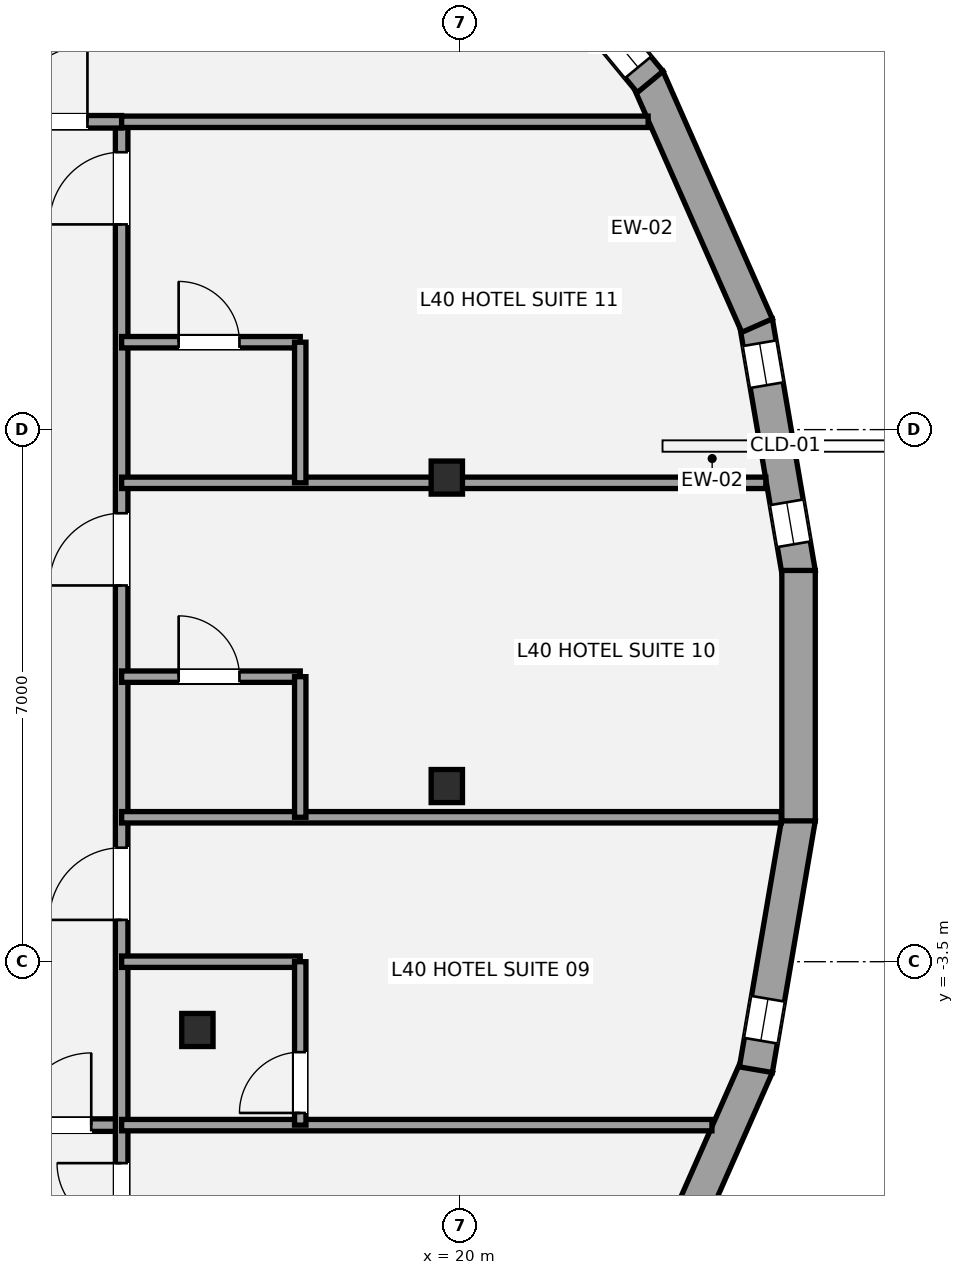
"""IFC4 building model, lengths in metres.
Left out: names, types, materials, properties, quantities, classifications, styles, units other than length and angle.
Written with IfcOpenShell. Run it as: python <this file> out.ifc"""

import sys

from ifc_helpers import new_model, si_unit, direction, frame, frame_2d, origin, origin_2d, place, context, subcontext, project, spatial, rectangle, i_section, extrude, element, fill, save


model = new_model("IFC4")
c1 = context("Model", 3, precision=1e-05, world=origin(), true_north=direction((0.0, 1.0)))
c2 = subcontext(c1, "Body", "Model", "MODEL_VIEW")
j1 = project(units=[si_unit("LENGTHUNIT", "METRE"), si_unit("PLANEANGLEUNIT", "RADIAN")], contexts=[c1])
p1 = place(None, origin())
s1 = spatial("IfcSite", under=j1, at=p1, CompositionType="ELEMENT")
p2 = place(p1, origin())
s2 = spatial("IfcBuilding", under=s1, at=p2, CompositionType="ELEMENT")
p3 = place(p2, frame((0.0, 0.0, 150.2)))
s3 = spatial("IfcBuildingStorey", under=s2, at=p3, CompositionType="ELEMENT", Elevation=150.2)
for number, where, z_axis, x_axis in (
    (1, (19.828, 2.869, 0.0), (0.0, 0.0, 1.0), (1.0, 0.0, 0.0)),
    (2, (16.547, -4.398, 0.0), (0.0, 0.0, 1.0), (1.0, 0.0, 0.0)),
    (3, (19.828, -1.189, 0.0), (0.0, 0.0, 1.0), (1.0, 0.0, 0.0)),
):
    element("IfcColumn", number, at=place(p3, frame(where, z_axis=z_axis, x_axis=x_axis)), inside=s3, PredefinedType="COLUMN", context=c2, shape_type="SweptSolid", body=[
        extrude(i_section(OverallWidth=0.412, OverallDepth=0.435, WebThickness=0.036, FlangeThickness=0.057, at=origin_2d()), origin(), (0.0, 0.0, 1.0), 3.2),
    ])
p4 = place(p3, frame((23.895, 4.921, 0.0), z_axis=(0.0, 0.0, 1.0), x_axis=(0.168075929829, -0.985774052109, 0.0)))
e4 = element("IfcWall", 4, at=p4, inside=s3, PredefinedType="STANDARD", context=c2, shape_type="SweptSolid", body=[
    extrude(rectangle(XDim=3.358, YDim=0.44, at=frame_2d((1.679, 0.0))), origin(), (0.0, 0.0, 1.0), 2.315),
])
p5 = place(p4, frame((2.411, 0.0, 0.58)))
e5 = element("IfcOpeningElement", 5, at=p5, cuts=e4, PredefinedType="OPENING", context=c2, shape_type="SweptSolid", body=[
    extrude(rectangle(XDim=0.56, YDim=1.15, at=frame_2d((0.28, 0.575))), frame((0.0, 0.23, 0.0), z_axis=(0.0, -1.0, 0.0), x_axis=(1.0, 0.0, 0.0)), (0.0, 0.0, 1.0), 0.46),
])
p6 = place(p4, frame((0.288, 0.0, 0.58)))
e6 = element("IfcOpeningElement", 6, at=p6, cuts=e4, PredefinedType="OPENING", context=c2, shape_type="SweptSolid", body=[
    extrude(rectangle(XDim=0.56, YDim=1.15, at=frame_2d((0.28, 0.575))), frame((0.0, 0.23, 0.0), z_axis=(0.0, -1.0, 0.0), x_axis=(1.0, 0.0, 0.0)), (0.0, 0.0, 1.0), 0.46),
])
p7 = place(p3, frame((22.472, 8.126, 0.0), z_axis=(0.0, 0.0, 1.0), x_axis=(0.403999745193, -0.914759097186, 0.0)))
e7 = element("IfcWall", 7, at=p7, inside=s3, PredefinedType="STANDARD", context=c2, shape_type="SweptSolid", body=[
    extrude(rectangle(XDim=3.561, YDim=0.44, at=frame_2d((1.78, 0.0))), origin(), (0.0, 0.0, 1.0), 2.315),
])
p8 = place(p3, frame((20.014, 11.088, 0.0), z_axis=(0.0, 0.0, 1.0), x_axis=(0.637002505989, -0.77086173038, 0.0)))
e8 = element("IfcWall", 8, at=p8, inside=s3, PredefinedType="STANDARD", context=c2, shape_type="SweptSolid", body=[
    extrude(rectangle(XDim=3.908, YDim=0.44, at=frame_2d((1.954, 0.0))), origin(), (0.0, 0.0, 1.0), 2.315),
])
p9 = place(p8, frame((2.76, 0.0, 0.58)))
e9 = element("IfcOpeningElement", 9, at=p9, cuts=e8, PredefinedType="OPENING", context=c2, shape_type="SweptSolid", body=[
    extrude(rectangle(XDim=0.9, YDim=1.35, at=frame_2d((0.45, 0.675))), frame((0.0, 0.23, 0.0), z_axis=(0.0, -1.0, 0.0), x_axis=(1.0, 0.0, 0.0)), (0.0, 0.0, 1.0), 0.46),
])
p10 = place(p3, frame((23.911, -4.869, 0.0), z_axis=(0.0, 0.0, 1.0), x_axis=(-0.403999745193, -0.914759097186, 0.0)))
e10 = element("IfcWall", 10, at=p10, inside=s3, PredefinedType="STANDARD", context=c2, shape_type="SweptSolid", body=[
    extrude(rectangle(XDim=3.561, YDim=0.44, at=frame_2d((1.78, 0.0))), origin(), (0.0, 0.0, 1.0), 2.315),
])
p11 = place(p3, frame((24.459, -1.61, 0.0), z_axis=(0.0, 0.0, 1.0), x_axis=(-0.168075929829, -0.985774052109, 0.0)))
e11 = element("IfcWall", 11, at=p11, inside=s3, PredefinedType="STANDARD", context=c2, shape_type="SweptSolid", body=[
    extrude(rectangle(XDim=3.358, YDim=0.44, at=frame_2d((1.679, 0.0))), origin(), (0.0, 0.0, 1.0), 2.315),
])
p12 = place(p11, frame((2.411, 0.0, 0.58)))
e12 = element("IfcOpeningElement", 12, at=p12, cuts=e11, PredefinedType="OPENING", context=c2, shape_type="SweptSolid", body=[
    extrude(rectangle(XDim=0.56, YDim=1.15, at=frame_2d((0.28, 0.575))), frame((0.0, 0.23, 0.0), z_axis=(0.0, -1.0, 0.0), x_axis=(1.0, 0.0, 0.0)), (0.0, 0.0, 1.0), 0.46),
])
p13 = place(p3, frame((24.456, 1.647, 0.0), z_axis=(0.0, 0.0, 1.0), x_axis=(0.0, -1.0, 0.0)))
e13 = element("IfcWall", 13, at=p13, inside=s3, PredefinedType="STANDARD", context=c2, shape_type="SweptSolid", body=[
    extrude(rectangle(XDim=3.295, YDim=0.44, at=frame_2d((1.647, 0.0))), origin(), (0.0, 0.0, 1.0), 2.315),
])
p14 = place(p3, frame((-15.55, -5.65, 0.0), z_axis=(0.0, 0.0, 1.0), x_axis=(1.0, 0.0, 0.0)))
e14 = element("IfcWall", 14, at=p14, inside=s3, PredefinedType="PARTITIONING", context=c2, shape_type="SweptSolid", body=[
    extrude(rectangle(XDim=31.1, YDim=0.165, at=frame_2d((15.55, 0.0))), origin(), (0.0, 0.0, 1.0), 2.398),
])
p15 = place(p14, frame((4.6, 0.0, 0.0)))
e15 = element("IfcOpeningElement", 15, at=p15, cuts=e14, PredefinedType="OPENING", context=c2, shape_type="SweptSolid", body=[
    extrude(rectangle(XDim=0.95, YDim=2.15, at=frame_2d((0.475, 1.075))), frame((0.0, 0.093, 0.0), z_axis=(0.0, -1.0, 0.0), x_axis=(1.0, 0.0, 0.0)), (0.0, 0.0, 1.0), 0.185),
])
p16 = place(p14, frame((11.0, 0.0, 0.0)))
e16 = element("IfcOpeningElement", 16, at=p16, cuts=e14, PredefinedType="OPENING", context=c2, shape_type="SweptSolid", body=[
    extrude(rectangle(XDim=0.95, YDim=2.15, at=frame_2d((0.475, 1.075))), frame((0.0, 0.093, 0.0), z_axis=(0.0, -1.0, 0.0), x_axis=(1.0, 0.0, 0.0)), (0.0, 0.0, 1.0), 0.185),
])
p17 = place(p14, frame((17.4, 0.0, 0.0)))
e17 = element("IfcOpeningElement", 17, at=p17, cuts=e14, PredefinedType="OPENING", context=c2, shape_type="SweptSolid", body=[
    extrude(rectangle(XDim=0.95, YDim=2.15, at=frame_2d((0.475, 1.075))), frame((0.0, 0.093, 0.0), z_axis=(0.0, -1.0, 0.0), x_axis=(1.0, 0.0, 0.0)), (0.0, 0.0, 1.0), 0.185),
])
p18 = place(p14, frame((23.8, 0.0, 0.0)))
e18 = element("IfcOpeningElement", 18, at=p18, cuts=e14, PredefinedType="OPENING", context=c2, shape_type="SweptSolid", body=[
    extrude(rectangle(XDim=0.95, YDim=2.15, at=frame_2d((0.475, 1.075))), frame((0.0, 0.093, 0.0), z_axis=(0.0, -1.0, 0.0), x_axis=(1.0, 0.0, 0.0)), (0.0, 0.0, 1.0), 0.185),
])
p19 = place(p14, frame((29.75, 0.0, 0.0)))
e19 = element("IfcOpeningElement", 19, at=p19, cuts=e14, PredefinedType="OPENING", context=c2, shape_type="SweptSolid", body=[
    extrude(rectangle(XDim=0.95, YDim=2.15, at=frame_2d((0.475, 1.075))), frame((0.0, 0.093, 0.0), z_axis=(0.0, -1.0, 0.0), x_axis=(1.0, 0.0, 0.0)), (0.0, 0.0, 1.0), 0.185),
])
p20 = place(p3, frame((15.55, -13.587, 0.0), z_axis=(0.0, 0.0, 1.0), x_axis=(0.0, 1.0, 0.0)))
e20 = element("IfcWall", 20, at=p20, inside=s3, PredefinedType="PARTITIONING", context=c2, shape_type="SweptSolid", body=[
    extrude(rectangle(XDim=21.137, YDim=0.165, at=frame_2d((10.568, 0.0))), origin(), (0.0, 0.0, 1.0), 2.473),
])
p21 = place(p20, frame((6.587, 0.0, 0.0)))
e21 = element("IfcOpeningElement", 21, at=p21, cuts=e20, PredefinedType="OPENING", context=c2, shape_type="SweptSolid", body=[
    extrude(rectangle(XDim=0.85, YDim=2.1, at=frame_2d((0.425, 1.05))), frame((0.0, 0.093, 0.0), z_axis=(0.0, -1.0, 0.0), x_axis=(1.0, 0.0, 0.0)), (0.0, 0.0, 1.0), 0.185),
])
p22 = place(p20, frame((10.637, 0.0, 0.0)))
e22 = element("IfcOpeningElement", 22, at=p22, cuts=e20, PredefinedType="OPENING", context=c2, shape_type="SweptSolid", body=[
    extrude(rectangle(XDim=0.95, YDim=2.15, at=frame_2d((0.475, 1.075))), frame((0.0, 0.093, 0.0), z_axis=(0.0, -1.0, 0.0), x_axis=(1.0, 0.0, 0.0)), (0.0, 0.0, 1.0), 0.185),
])
p23 = place(p20, frame((15.037, 0.0, 0.0)))
e23 = element("IfcOpeningElement", 23, at=p23, cuts=e20, PredefinedType="OPENING", context=c2, shape_type="SweptSolid", body=[
    extrude(rectangle(XDim=0.95, YDim=2.15, at=frame_2d((0.475, 1.075))), frame((0.0, 0.093, 0.0), z_axis=(0.0, -1.0, 0.0), x_axis=(1.0, 0.0, 0.0)), (0.0, 0.0, 1.0), 0.185),
])
p24 = place(p20, frame((19.787, 0.0, 0.0)))
e24 = element("IfcOpeningElement", 24, at=p24, cuts=e20, PredefinedType="OPENING", context=c2, shape_type="SweptSolid", body=[
    extrude(rectangle(XDim=0.95, YDim=2.15, at=frame_2d((0.475, 1.075))), frame((0.0, 0.093, 0.0), z_axis=(0.0, -1.0, 0.0), x_axis=(1.0, 0.0, 0.0)), (0.0, 0.0, 1.0), 0.185),
])
p25 = place(p3, frame((13.8, 7.55, 0.0), z_axis=(0.0, 0.0, 1.0), x_axis=(1.0, 0.0, 0.0)))
e25 = element("IfcWall", 25, at=p25, inside=s3, PredefinedType="PARTITIONING", context=c2, shape_type="SweptSolid", body=[
    extrude(rectangle(XDim=1.75, YDim=0.165, at=frame_2d((0.875, 0.0))), origin(), (0.0, 0.0, 1.0), 3.02),
])
p26 = place(p25, frame((0.3, 0.0, 0.0)))
e26 = element("IfcOpeningElement", 26, at=p26, cuts=e25, PredefinedType="OPENING", context=c2, shape_type="SweptSolid", body=[
    extrude(rectangle(XDim=1.0, YDim=2.15, at=frame_2d((0.5, 1.075))), frame((0.0, 0.093, 0.0), z_axis=(0.0, -1.0, 0.0), x_axis=(1.0, 0.0, 0.0)), (0.0, 0.0, 1.0), 0.185),
])
p27 = place(p3, frame((15.55, 7.55, 0.0), z_axis=(0.0, 0.0, 1.0), x_axis=(1.0, 0.0, 0.0)))
e27 = element("IfcWall", 27, at=p27, inside=s3, PredefinedType="PLUMBINGWALL", context=c2, shape_type="SweptSolid", body=[
    extrude(rectangle(XDim=6.927, YDim=0.15, at=frame_2d((3.464, 0.0))), origin(), (0.0, 0.0, 1.0), 3.02),
])
p28 = place(p3, frame((15.55, -5.65, 0.0), z_axis=(0.0, 0.0, 1.0), x_axis=(1.0, 0.0, 0.0)))
e28 = element("IfcWall", 28, at=p28, inside=s3, PredefinedType="PLUMBINGWALL", context=c2, shape_type="SweptSolid", body=[
    extrude(rectangle(XDim=7.766, YDim=0.15, at=frame_2d((3.883, 0.0))), origin(), (0.0, 0.0, 1.0), 2.473),
])
p29 = place(p3, frame((15.55, -1.6, 0.0), z_axis=(0.0, 0.0, 1.0), x_axis=(1.0, 0.0, 0.0)))
e29 = element("IfcWall", 29, at=p29, inside=s3, PredefinedType="PLUMBINGWALL", context=c2, shape_type="SweptSolid", body=[
    extrude(rectangle(XDim=8.678, YDim=0.15, at=frame_2d((4.339, 0.0))), origin(), (0.0, 0.0, 1.0), 2.398),
])
p30 = place(p3, frame((15.55, 2.8, 0.0), z_axis=(0.0, 0.0, 1.0), x_axis=(1.0, 0.0, 0.0)))
e30 = element("IfcWall", 30, at=p30, inside=s3, PredefinedType="PLUMBINGWALL", context=c2, shape_type="SweptSolid", body=[
    extrude(rectangle(XDim=8.475, YDim=0.15, at=frame_2d((4.238, 0.0))), origin(), (0.0, 0.0, 1.0), 2.473),
])
p31 = place(p3, frame((15.55, -3.5, 0.0), z_axis=(0.0, 0.0, 1.0), x_axis=(1.0, 0.0, 0.0)))
e31 = element("IfcWall", 31, at=p31, inside=s3, PredefinedType="PLUMBINGWALL", context=c2, shape_type="SweptSolid", body=[
    extrude(rectangle(XDim=2.35, YDim=0.15, at=frame_2d((1.175, 0.0))), origin(), (0.0, 0.0, 1.0), 2.398),
])
p32 = place(p3, frame((17.9, -5.65, 0.0), z_axis=(0.0, 0.0, 1.0), x_axis=(0.0, 1.0, 0.0)))
e32 = element("IfcWall", 32, at=p32, inside=s3, PredefinedType="PLUMBINGWALL", context=c2, shape_type="SweptSolid", body=[
    extrude(rectangle(XDim=2.15, YDim=0.15, at=frame_2d((1.075, 0.0))), origin(), (0.0, 0.0, 1.0), 2.473),
])
p33 = place(p32, frame((0.16, 0.0, 0.0)))
e33 = element("IfcOpeningElement", 33, at=p33, cuts=e32, PredefinedType="OPENING", context=c2, shape_type="SweptSolid", body=[
    extrude(rectangle(XDim=0.8, YDim=2.1, at=frame_2d((0.4, 1.05))), frame((0.0, 0.085, 0.0), z_axis=(0.0, -1.0, 0.0), x_axis=(1.0, 0.0, 0.0)), (0.0, 0.0, 1.0), 0.17),
])
p34 = place(p3, frame((15.55, 0.25, 0.0), z_axis=(0.0, 0.0, 1.0), x_axis=(1.0, 0.0, 0.0)))
e34 = element("IfcWall", 34, at=p34, inside=s3, PredefinedType="PLUMBINGWALL", context=c2, shape_type="SweptSolid", body=[
    extrude(rectangle(XDim=2.35, YDim=0.15, at=frame_2d((1.175, 0.0))), origin(), (0.0, 0.0, 1.0), 2.473),
])
p35 = place(p34, frame((0.75, 0.0, 0.0)))
e35 = element("IfcOpeningElement", 35, at=p35, cuts=e34, PredefinedType="OPENING", context=c2, shape_type="SweptSolid", body=[
    extrude(rectangle(XDim=0.8, YDim=2.1, at=frame_2d((0.4, 1.05))), frame((0.0, 0.085, 0.0), z_axis=(0.0, -1.0, 0.0), x_axis=(1.0, 0.0, 0.0)), (0.0, 0.0, 1.0), 0.17),
])
p36 = place(p3, frame((17.9, -1.6, 0.0), z_axis=(0.0, 0.0, 1.0), x_axis=(0.0, 1.0, 0.0)))
e36 = element("IfcWall", 36, at=p36, inside=s3, PredefinedType="PLUMBINGWALL", context=c2, shape_type="SweptSolid", body=[
    extrude(rectangle(XDim=1.85, YDim=0.15, at=frame_2d((0.925, 0.0))), origin(), (0.0, 0.0, 1.0), 3.02),
])
p37 = place(p3, frame((15.55, 4.65, 0.0), z_axis=(0.0, 0.0, 1.0), x_axis=(1.0, 0.0, 0.0)))
e37 = element("IfcWall", 37, at=p37, inside=s3, PredefinedType="PLUMBINGWALL", context=c2, shape_type="SweptSolid", body=[
    extrude(rectangle(XDim=2.35, YDim=0.15, at=frame_2d((1.175, 0.0))), origin(), (0.0, 0.0, 1.0), 3.02),
])
p38 = place(p37, frame((0.75, 0.0, 0.0)))
e38 = element("IfcOpeningElement", 38, at=p38, cuts=e37, PredefinedType="OPENING", context=c2, shape_type="SweptSolid", body=[
    extrude(rectangle(XDim=0.8, YDim=2.1, at=frame_2d((0.4, 1.05))), frame((0.0, 0.085, 0.0), z_axis=(0.0, -1.0, 0.0), x_axis=(1.0, 0.0, 0.0)), (0.0, 0.0, 1.0), 0.17),
])
p39 = place(p3, frame((17.9, 2.8, 0.0), z_axis=(0.0, 0.0, 1.0), x_axis=(0.0, 1.0, 0.0)))
e39 = element("IfcWall", 39, at=p39, inside=s3, PredefinedType="PLUMBINGWALL", context=c2, shape_type="SweptSolid", body=[
    extrude(rectangle(XDim=1.85, YDim=0.15, at=frame_2d((0.925, 0.0))), origin(), (0.0, 0.0, 1.0), 3.02),
])
p40 = place(p9, origin())
e40 = element("IfcWindow", 40, at=p40, inside=s3, PartitioningType="SINGLE_PANEL", PredefinedType="WINDOW", context=c2, shape_type="SweptSolid", body=[
    extrude(rectangle(XDim=0.9, YDim=1.35, at=frame_2d((0.45, 0.675))), frame((0.0, -0.01, 0.0), z_axis=(0.0, -1.0, 0.0), x_axis=(1.0, 0.0, 0.0)), (0.0, 0.0, 1.0), 0.06),
])
fill(e9, e40)
p41 = place(p12, origin())
e41 = element("IfcWindow", 41, at=p41, inside=s3, PartitioningType="SINGLE_PANEL", PredefinedType="WINDOW", context=c2, shape_type="SweptSolid", body=[
    extrude(rectangle(XDim=0.56, YDim=1.15, at=frame_2d((0.28, 0.575))), frame((0.0, -0.01, 0.0), z_axis=(0.0, -1.0, 0.0), x_axis=(1.0, 0.0, 0.0)), (0.0, 0.0, 1.0), 0.06),
])
fill(e12, e41)
p42 = place(p5, origin())
e42 = element("IfcWindow", 42, at=p42, inside=s3, PartitioningType="SINGLE_PANEL", PredefinedType="WINDOW", context=c2, shape_type="SweptSolid", body=[
    extrude(rectangle(XDim=0.56, YDim=1.15, at=frame_2d((0.28, 0.575))), frame((0.0, -0.01, 0.0), z_axis=(0.0, -1.0, 0.0), x_axis=(1.0, 0.0, 0.0)), (0.0, 0.0, 1.0), 0.06),
])
fill(e5, e42)
p43 = place(p6, origin())
e43 = element("IfcWindow", 43, at=p43, inside=s3, PartitioningType="SINGLE_PANEL", PredefinedType="WINDOW", context=c2, shape_type="SweptSolid", body=[
    extrude(rectangle(XDim=0.56, YDim=1.15, at=frame_2d((0.28, 0.575))), frame((0.0, -0.01, 0.0), z_axis=(0.0, -1.0, 0.0), x_axis=(1.0, 0.0, 0.0)), (0.0, 0.0, 1.0), 0.06),
])
fill(e6, e43)
p44 = place(p26, origin())
e44 = element("IfcDoor", 44, at=p44, inside=s3, OperationType="SINGLE_SWING_RIGHT", PredefinedType="DOOR", context=c2, shape_type="SweptSolid", body=[
    extrude(rectangle(XDim=1.0, YDim=2.15, at=frame_2d((0.5, 1.075))), frame((0.0, 0.025, 0.0), z_axis=(0.0, -1.0, 0.0), x_axis=(1.0, 0.0, 0.0)), (0.0, 0.0, 1.0), 0.05),
])
fill(e26, e44)
p45 = place(p21, origin())
e45 = element("IfcDoor", 45, at=p45, inside=s3, OperationType="SINGLE_SWING_RIGHT", PredefinedType="DOOR", context=c2, shape_type="SweptSolid", body=[
    extrude(rectangle(XDim=0.85, YDim=2.1, at=frame_2d((0.425, 1.05))), frame((0.0, 0.025, 0.0), z_axis=(0.0, -1.0, 0.0), x_axis=(1.0, 0.0, 0.0)), (0.0, 0.0, 1.0), 0.05),
])
fill(e21, e45)
p46 = place(p19, origin())
e46 = element("IfcDoor", 46, at=p46, inside=s3, OperationType="SINGLE_SWING_RIGHT", PredefinedType="DOOR", context=c2, shape_type="SweptSolid", body=[
    extrude(rectangle(XDim=0.95, YDim=2.15, at=frame_2d((0.475, 1.075))), frame((0.0, 0.025, 0.0), z_axis=(0.0, -1.0, 0.0), x_axis=(1.0, 0.0, 0.0)), (0.0, 0.0, 1.0), 0.05),
])
fill(e19, e46)
p47 = place(p22, origin())
e47 = element("IfcDoor", 47, at=p47, inside=s3, OperationType="SINGLE_SWING_LEFT", PredefinedType="DOOR", context=c2, shape_type="SweptSolid", body=[
    extrude(rectangle(XDim=0.95, YDim=2.15, at=frame_2d((0.475, 1.075))), frame((0.0, 0.025, 0.0), z_axis=(0.0, -1.0, 0.0), x_axis=(1.0, 0.0, 0.0)), (0.0, 0.0, 1.0), 0.05),
])
fill(e22, e47)
p48 = place(p33, origin())
e48 = element("IfcDoor", 48, at=p48, inside=s3, OperationType="SINGLE_SWING_LEFT", PredefinedType="DOOR", context=c2, shape_type="SweptSolid", body=[
    extrude(rectangle(XDim=0.8, YDim=2.1, at=frame_2d((0.4, 1.05))), frame((0.0, 0.025, 0.0), z_axis=(0.0, -1.0, 0.0), x_axis=(1.0, 0.0, 0.0)), (0.0, 0.0, 1.0), 0.05),
])
fill(e33, e48)
p49 = place(p23, origin())
e49 = element("IfcDoor", 49, at=p49, inside=s3, OperationType="SINGLE_SWING_LEFT", PredefinedType="DOOR", context=c2, shape_type="SweptSolid", body=[
    extrude(rectangle(XDim=0.95, YDim=2.15, at=frame_2d((0.475, 1.075))), frame((0.0, 0.025, 0.0), z_axis=(0.0, -1.0, 0.0), x_axis=(1.0, 0.0, 0.0)), (0.0, 0.0, 1.0), 0.05),
])
fill(e23, e49)
p50 = place(p35, origin())
e50 = element("IfcDoor", 50, at=p50, inside=s3, OperationType="SINGLE_SWING_LEFT", PredefinedType="DOOR", context=c2, shape_type="SweptSolid", body=[
    extrude(rectangle(XDim=0.8, YDim=2.1, at=frame_2d((0.4, 1.05))), frame((0.0, 0.025, 0.0), z_axis=(0.0, -1.0, 0.0), x_axis=(1.0, 0.0, 0.0)), (0.0, 0.0, 1.0), 0.05),
])
fill(e35, e50)
p51 = place(p24, origin())
e51 = element("IfcDoor", 51, at=p51, inside=s3, OperationType="SINGLE_SWING_LEFT", PredefinedType="DOOR", context=c2, shape_type="SweptSolid", body=[
    extrude(rectangle(XDim=0.95, YDim=2.15, at=frame_2d((0.475, 1.075))), frame((0.0, 0.025, 0.0), z_axis=(0.0, -1.0, 0.0), x_axis=(1.0, 0.0, 0.0)), (0.0, 0.0, 1.0), 0.05),
])
fill(e24, e51)
p52 = place(p38, origin())
e52 = element("IfcDoor", 52, at=p52, inside=s3, OperationType="SINGLE_SWING_LEFT", PredefinedType="DOOR", context=c2, shape_type="SweptSolid", body=[
    extrude(rectangle(XDim=0.8, YDim=2.1, at=frame_2d((0.4, 1.05))), frame((0.0, 0.025, 0.0), z_axis=(0.0, -1.0, 0.0), x_axis=(1.0, 0.0, 0.0)), (0.0, 0.0, 1.0), 0.05),
])
fill(e38, e52)
save(model, sys.argv[1])
